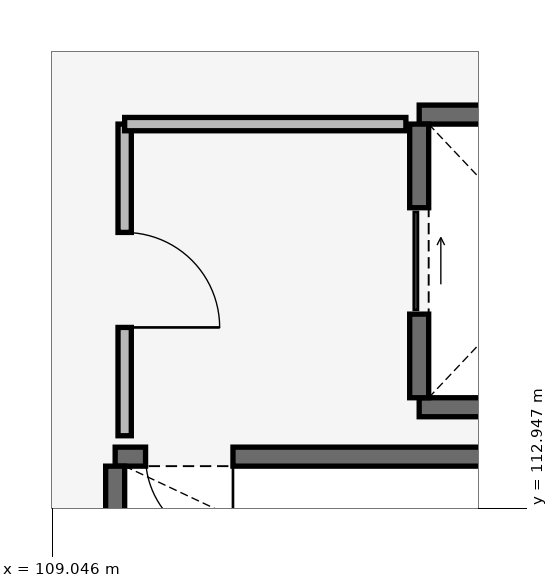
"""IFC4 building model, lengths in metres.
Left out: names, types, materials, properties, quantities, classifications, styles, units other than length and angle.
Written with IfcOpenShell. Run it as: python <this file> out.ifc"""

import sys

from ifc_helpers import new_model, si_unit, direction, frame, frame_2d, origin, place, context, subcontext, project, spatial, rectangle, extrude, element, fill, save


model = new_model("IFC4")
c1 = context("Model", 3, precision=1e-05, world=origin(), true_north=direction((0.0, 1.0)))
c2 = subcontext(c1, "Body", "Model", "MODEL_VIEW")
j1 = project(units=[si_unit("LENGTHUNIT", "METRE"), si_unit("PLANEANGLEUNIT", "RADIAN")], contexts=[c1])
p1 = place(None, origin())
s1 = spatial("IfcSite", under=j1, at=p1, CompositionType="ELEMENT")
p2 = place(p1, origin())
s2 = spatial("IfcBuilding", under=s1, at=p2, CompositionType="ELEMENT")
p3 = place(p2, frame((0.0, 0.0, 5.4)))
s3 = spatial("IfcBuildingStorey", under=s2, at=p3, CompositionType="ELEMENT", Elevation=5.4)
p4 = place(p3, frame((109.875, 113.625, 0.0), z_axis=(0.0, 0.0, 1.0), x_axis=(1.0, 0.0, 0.0)))
e1 = element("IfcWall", 1, at=p4, inside=s3, PredefinedType="SHEAR", context=c2, shape_type="SweptSolid", body=[
    extrude(rectangle(XDim=7.27, YDim=0.25, at=frame_2d((3.635, 0.0))), origin(), (0.0, 0.0, 1.0), 4.52),
])
p5 = place(p4, frame((0.4, 0.0, 0.0)))
e2 = element("IfcOpeningElement", 2, at=p5, cuts=e1, PredefinedType="OPENING", context=c2, shape_type="SweptSolid", body=[
    extrude(rectangle(XDim=1.15, YDim=2.15, at=frame_2d((0.575, 1.075))), frame((0.0, 0.14, 0.0), z_axis=(0.0, -1.0, 0.0), x_axis=(1.0, 0.0, 0.0)), (0.0, 0.0, 1.0), 0.28),
])
p6 = place(p3, frame((109.875, 110.2, 0.0), z_axis=(0.0, 0.0, 1.0), x_axis=(0.0, 1.0, 0.0)))
e3 = element("IfcWall", 3, at=p6, inside=s3, PredefinedType="SHEAR", context=c2, shape_type="SweptSolid", body=[
    extrude(rectangle(XDim=3.3, YDim=0.25, at=frame_2d((1.65, 0.0))), origin(), (0.0, 0.0, 1.0), 4.52),
])
for number, where, z_axis, x_axis in (
    (4, (113.875, 114.275, 0.0), (0.0, 0.0, 1.0), (1.0, 0.0, 0.0)),
    (5, (113.875, 118.125, 0.0), (0.0, 0.0, 1.0), (1.0, 0.0, 0.0)),
):
    element("IfcWall", number, at=place(p3, frame(where, z_axis=z_axis, x_axis=x_axis)), inside=s3, PredefinedType="SHEAR", context=c2, shape_type="SweptSolid", body=[
        extrude(rectangle(XDim=3.65, YDim=0.25, at=frame_2d((1.825, 0.0))), origin(), (0.0, 0.0, 1.0), 4.52),
    ])
p7 = place(p3, frame((113.875, 114.4, 0.0), z_axis=(0.0, 0.0, 1.0), x_axis=(0.0, 1.0, 0.0)))
e6 = element("IfcWall", 6, at=p7, inside=s3, PredefinedType="SHEAR", context=c2, shape_type="SweptSolid", body=[
    extrude(rectangle(XDim=3.6, YDim=0.25, at=frame_2d((1.8, 0.0))), origin(), (0.0, 0.0, 1.0), 4.52),
])
p8 = place(p7, frame((1.1, 0.0, 0.0)))
e7 = element("IfcOpeningElement", 7, at=p8, cuts=e6, PredefinedType="OPENING", context=c2, shape_type="SweptSolid", body=[
    extrude(rectangle(XDim=1.4, YDim=2.2, at=frame_2d((0.7, 1.1))), frame((0.0, 0.14, 0.0), z_axis=(0.0, -1.0, 0.0), x_axis=(1.0, 0.0, 0.0)), (0.0, 0.0, 1.0), 0.28),
])
p9 = place(p3, frame((110.0, 113.9, 0.0), z_axis=(0.0, 0.0, 1.0), x_axis=(0.0, 1.0, 0.0)))
e8 = element("IfcWall", 8, at=p9, inside=s3, PredefinedType="PARTITIONING", context=c2, shape_type="SweptSolid", body=[
    extrude(rectangle(XDim=4.1, YDim=0.175, at=frame_2d((2.05, 0.0))), origin(), (0.0, 0.0, 1.0), 4.52),
])
p10 = place(p9, frame((1.425, 0.0, 0.0)))
e9 = element("IfcOpeningElement", 9, at=p10, cuts=e8, PredefinedType="OPENING", context=c2, shape_type="SweptSolid", body=[
    extrude(rectangle(XDim=1.25, YDim=2.2, at=frame_2d((0.625, 1.1))), frame((0.0, 0.103, 0.0), z_axis=(0.0, -1.0, 0.0), x_axis=(1.0, 0.0, 0.0)), (0.0, 0.0, 1.0), 0.205),
])
p11 = place(p3, frame((110.0, 118.0, 0.0), z_axis=(0.0, 0.0, 1.0), x_axis=(1.0, 0.0, 0.0)))
e10 = element("IfcWall", 10, at=p11, inside=s3, PredefinedType="PARTITIONING", context=c2, shape_type="SweptSolid", body=[
    extrude(rectangle(XDim=3.7, YDim=0.175, at=frame_2d((1.85, 0.0))), origin(), (0.0, 0.0, 1.0), 4.52),
])
p12 = place(p5, frame((1.15, 0.0, 0.0), z_axis=(0.0, 0.0, 1.0), x_axis=(-1.0, 0.0, 0.0)))
e11 = element("IfcDoor", 11, at=p12, inside=s3, OperationType="SINGLE_SWING_RIGHT", PredefinedType="DOOR", context=c2, shape_type="SweptSolid", body=[
    extrude(rectangle(XDim=1.15, YDim=2.15, at=frame_2d((0.575, 1.075))), frame((0.0, 0.025, 0.0), z_axis=(0.0, -1.0, 0.0), x_axis=(1.0, 0.0, 0.0)), (0.0, 0.0, 1.0), 0.05),
])
fill(e2, e11)
p13 = place(p8, origin())
e12 = element("IfcDoor", 12, at=p13, inside=s3, OperationType="SLIDING_TO_RIGHT", PredefinedType="DOOR", context=c2, shape_type="SweptSolid", body=[
    extrude(rectangle(XDim=1.4, YDim=2.2, at=frame_2d((0.7, 1.1))), frame((0.0, 0.025, 0.0), z_axis=(0.0, -1.0, 0.0), x_axis=(1.0, 0.0, 0.0)), (0.0, 0.0, 1.0), 0.05),
])
fill(e7, e12)
p14 = place(p10, frame((1.25, 0.0, 0.0), z_axis=(0.0, 0.0, 1.0), x_axis=(-1.0, 0.0, 0.0)))
e13 = element("IfcDoor", 13, at=p14, inside=s3, OperationType="SINGLE_SWING_LEFT", PredefinedType="DOOR", context=c2, shape_type="SweptSolid", body=[
    extrude(rectangle(XDim=1.25, YDim=2.2, at=frame_2d((0.625, 1.1))), frame((0.0, 0.025, 0.0), z_axis=(0.0, -1.0, 0.0), x_axis=(1.0, 0.0, 0.0)), (0.0, 0.0, 1.0), 0.05),
])
fill(e9, e13)
save(model, sys.argv[1])
